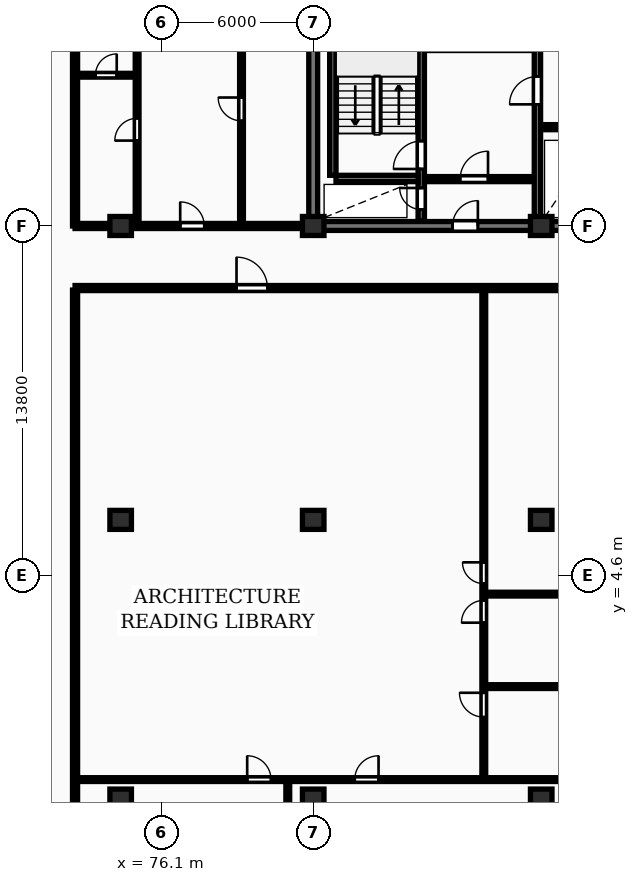
"""IFC4 building model, lengths in metres.
Left out: names, types, materials, properties, quantities, classifications, styles, units other than length and angle.
Written with IfcOpenShell. Run it as: python <this file> out.ifc"""

import sys

from ifc_helpers import new_model, si_unit, direction, frame, frame_2d, origin, origin_2d, place, context, subcontext, project, spatial, rectangle, extrude, element, fill, save


model = new_model("IFC4")
c1 = context("Model", 3, precision=1e-05, world=origin(), true_north=direction((0.0, 1.0)))
c2 = subcontext(c1, "Body", "Model", "MODEL_VIEW")
j1 = project(units=[si_unit("LENGTHUNIT", "METRE"), si_unit("PLANEANGLEUNIT", "RADIAN")], contexts=[c1])
p1 = place(None, origin())
s1 = spatial("IfcSite", under=j1, at=p1, CompositionType="ELEMENT")
p2 = place(p1, origin())
s2 = spatial("IfcBuilding", under=s1, at=p2, CompositionType="ELEMENT")
p3 = place(p2, frame((0.0, 0.0, 113.3)))
s3 = spatial("IfcBuildingStorey", under=s2, at=p3, CompositionType="ELEMENT", Elevation=113.3)
for number, where, z_axis, x_axis in (
    (1, (74.5, -4.2, 0.0), (0.0, 0.0, 1.0), (1.0, 0.0, 0.0)),
    (2, (74.5, 6.8, 0.0), (0.0, 0.0, 1.0), (1.0, 0.0, 0.0)),
    (3, (74.5, 18.4, 0.0), (0.0, 0.0, 1.0), (1.0, 0.0, 0.0)),
    (4, (82.1, -4.2, 0.0), (0.0, 0.0, 1.0), (1.0, 0.0, 0.0)),
    (5, (82.1, 6.8, 0.0), (0.0, 0.0, 1.0), (1.0, 0.0, 0.0)),
    (6, (82.1, 18.4, 0.0), (0.0, 0.0, 1.0), (1.0, 0.0, 0.0)),
    (7, (91.1, -4.2, 0.0), (0.0, 0.0, 1.0), (1.0, 0.0, 0.0)),
    (8, (91.1, 6.8, 0.0), (0.0, 0.0, 1.0), (1.0, 0.0, 0.0)),
    (9, (91.1, 18.4, 0.0), (0.0, 0.0, 1.0), (1.0, 0.0, 0.0)),
):
    element("IfcColumn", number, at=place(p3, frame(where, z_axis=z_axis, x_axis=x_axis)), inside=s3, PredefinedType="COLUMN", context=c2, shape_type="SweptSolid", body=[
        extrude(rectangle(XDim=0.85, YDim=0.75, at=origin_2d()), origin(), (0.0, 0.0, 1.0), 3.25),
    ])
p4 = place(p3, frame((82.1, 18.575, 0.0), z_axis=(0.0, 0.0, 1.0), x_axis=(0.0, 1.0, 0.0)))
e10 = element("IfcWall", 10, at=p4, inside=s3, PredefinedType="SHEAR", context=c2, shape_type="SweptSolid", body=[
    extrude(rectangle(XDim=11.65, YDim=0.35, at=frame_2d((5.825, 0.0))), origin(), (0.0, 0.0, 1.0), 3.25),
])
p5 = place(p3, frame((81.925, 18.4, 0.0), z_axis=(0.0, 0.0, 1.0), x_axis=(1.0, 0.0, 0.0)))
e11 = element("IfcWall", 11, at=p5, inside=s3, PredefinedType="SHEAR", context=c2, shape_type="SweptSolid", body=[
    extrude(rectangle(XDim=36.265, YDim=0.35, at=frame_2d((18.132, 0.0))), origin(), (0.0, 0.0, 1.0), 3.25),
])
p6 = place(p5, frame((5.675, 0.0, 0.0)))
e12 = element("IfcOpeningElement", 12, at=p6, cuts=e11, PredefinedType="OPENING", context=c2, shape_type="SweptSolid", body=[
    extrude(rectangle(XDim=1.0, YDim=2.15, at=frame_2d((0.5, 1.075))), frame((0.0, 0.185, 0.0), z_axis=(0.0, -1.0, 0.0), x_axis=(1.0, 0.0, 0.0)), (0.0, 0.0, 1.0), 0.37),
])
p7 = place(p5, frame((21.925, 0.0, 0.0)))
e13 = element("IfcOpeningElement", 13, at=p7, cuts=e11, PredefinedType="OPENING", context=c2, shape_type="SweptSolid", body=[
    extrude(rectangle(XDim=1.5, YDim=2.2, at=frame_2d((0.75, 1.1))), frame((0.0, 0.185, 0.0), z_axis=(0.0, -1.0, 0.0), x_axis=(1.0, 0.0, 0.0)), (0.0, 0.0, 1.0), 0.37),
])
p8 = place(p5, frame((29.875, 0.0, 0.0)))
e14 = element("IfcOpeningElement", 14, at=p8, cuts=e11, PredefinedType="OPENING", context=c2, shape_type="SweptSolid", body=[
    extrude(rectangle(XDim=1.0, YDim=2.15, at=frame_2d((0.5, 1.075))), frame((0.0, 0.185, 0.0), z_axis=(0.0, -1.0, 0.0), x_axis=(1.0, 0.0, 0.0)), (0.0, 0.0, 1.0), 0.37),
])
p9 = place(p3, frame((82.875, 20.4, 0.0), z_axis=(0.0, 0.0, 1.0), x_axis=(0.0, 1.0, 0.0)))
e15 = element("IfcWall", 15, at=p9, inside=s3, PredefinedType="SHEAR", context=c2, shape_type="SweptSolid", body=[
    extrude(rectangle(XDim=7.6, YDim=0.25, at=frame_2d((3.8, 0.0))), origin(), (0.0, 0.0, 1.0), 3.25),
])
p10 = place(p3, frame((86.365, 18.6, 0.0), z_axis=(0.0, 0.0, 1.0), x_axis=(0.0, 1.0, 0.0)))
e16 = element("IfcWall", 16, at=p10, inside=s3, PredefinedType="SHEAR", context=c2, shape_type="SweptSolid", body=[
    extrude(rectangle(XDim=11.6, YDim=0.25, at=frame_2d((5.8, 0.0))), origin(), (0.0, 0.0, 1.0), 3.25),
])
p11 = place(p10, frame((0.45, 0.0, 0.0)))
e17 = element("IfcOpeningElement", 17, at=p11, cuts=e16, PredefinedType="OPENING", context=c2, shape_type="SweptSolid", body=[
    extrude(rectangle(XDim=0.85, YDim=2.05, at=frame_2d((0.425, 1.025))), frame((0.0, 0.135, 0.0), z_axis=(0.0, -1.0, 0.0), x_axis=(1.0, 0.0, 0.0)), (0.0, 0.0, 1.0), 0.27),
])
p12 = place(p10, frame((2.05, 0.0, 0.0)))
e18 = element("IfcOpeningElement", 18, at=p12, cuts=e16, PredefinedType="OPENING", context=c2, shape_type="SweptSolid", body=[
    extrude(rectangle(XDim=1.1, YDim=2.1, at=frame_2d((0.55, 1.05))), frame((0.0, 0.135, 0.0), z_axis=(0.0, -1.0, 0.0), x_axis=(1.0, 0.0, 0.0)), (0.0, 0.0, 1.0), 0.27),
])
p13 = place(p10, frame((9.95, 0.0, 0.0)))
e19 = element("IfcOpeningElement", 19, at=p13, cuts=e16, PredefinedType="OPENING", context=c2, shape_type="SweptSolid", body=[
    extrude(rectangle(XDim=0.85, YDim=2.05, at=frame_2d((0.425, 1.025))), frame((0.0, 0.135, 0.0), z_axis=(0.0, -1.0, 0.0), x_axis=(1.0, 0.0, 0.0)), (0.0, 0.0, 1.0), 0.27),
])
p14 = place(p3, frame((83.0, 20.275, 0.0), z_axis=(0.0, 0.0, 1.0), x_axis=(1.0, 0.0, 0.0)))
e20 = element("IfcWall", 20, at=p14, inside=s3, PredefinedType="SHEAR", context=c2, shape_type="SweptSolid", body=[
    extrude(rectangle(XDim=3.24, YDim=0.25, at=frame_2d((1.62, 0.0))), origin(), (0.0, 0.0, 1.0), 3.25),
])
p15 = place(p3, frame((86.5, 20.25, 0.0), z_axis=(0.0, 0.0, 1.0), x_axis=(1.0, 0.0, 0.0)))
e21 = element("IfcWall", 21, at=p15, inside=s3, PredefinedType="PARTITIONING", context=c2, shape_type="SweptSolid", body=[
    extrude(rectangle(XDim=4.32, YDim=0.2, at=frame_2d((2.16, 0.0))), origin(), (0.0, 0.0, 1.0), 2.97),
])
p16 = place(p15, frame((1.4, 0.0, 0.0)))
e22 = element("IfcOpeningElement", 22, at=p16, cuts=e21, PredefinedType="OPENING", context=c2, shape_type="SweptSolid", body=[
    extrude(rectangle(XDim=1.1, YDim=2.1, at=frame_2d((0.55, 1.05))), frame((0.0, 0.11, 0.0), z_axis=(0.0, -1.0, 0.0), x_axis=(1.0, 0.0, 0.0)), (0.0, 0.0, 1.0), 0.22),
])
p17 = place(p3, frame((90.95, 18.6, 0.0), z_axis=(0.0, 0.0, 1.0), x_axis=(0.0, 1.0, 0.0)))
e23 = element("IfcWall", 23, at=p17, inside=s3, PredefinedType="SHEAR", context=c2, shape_type="SweptSolid", body=[
    extrude(rectangle(XDim=11.6, YDim=0.25, at=frame_2d((5.8, 0.0))), origin(), (0.0, 0.0, 1.0), 3.25),
])
p18 = place(p17, frame((4.6, 0.0, 0.0)))
e24 = element("IfcOpeningElement", 24, at=p18, cuts=e23, PredefinedType="OPENING", context=c2, shape_type="SweptSolid", body=[
    extrude(rectangle(XDim=1.1, YDim=2.1, at=frame_2d((0.55, 1.05))), frame((0.0, 0.135, 0.0), z_axis=(0.0, -1.0, 0.0), x_axis=(1.0, 0.0, 0.0)), (0.0, 0.0, 1.0), 0.27),
])
p19 = place(p3, frame((91.08, 22.3, 0.0), z_axis=(0.0, 0.0, 1.0), x_axis=(1.0, 0.0, 0.0)))
e25 = element("IfcWall", 25, at=p19, inside=s3, PredefinedType="PARTITIONING", context=c2, shape_type="SweptSolid", body=[
    extrude(rectangle(XDim=19.14, YDim=0.2, at=frame_2d((9.57, 0.0))), origin(), (0.0, 0.0, 1.0), 2.97),
])
p20 = place(p19, frame((1.15, 0.0, 0.0)))
e26 = element("IfcOpeningElement", 26, at=p20, cuts=e25, PredefinedType="OPENING", context=c2, shape_type="SweptSolid", body=[
    extrude(rectangle(XDim=0.85, YDim=2.05, at=frame_2d((0.425, 1.025))), frame((0.0, 0.11, 0.0), z_axis=(0.0, -1.0, 0.0), x_axis=(1.0, 0.0, 0.0)), (0.0, 0.0, 1.0), 0.22),
])
p21 = place(p19, frame((3.2, 0.0, 0.0)))
e27 = element("IfcOpeningElement", 27, at=p21, cuts=e25, PredefinedType="OPENING", context=c2, shape_type="SweptSolid", body=[
    extrude(rectangle(XDim=0.85, YDim=2.05, at=frame_2d((0.425, 1.025))), frame((0.0, 0.11, 0.0), z_axis=(0.0, -1.0, 0.0), x_axis=(1.0, 0.0, 0.0)), (0.0, 0.0, 1.0), 0.22),
])
p22 = place(p19, frame((12.72, 0.0, 0.0)))
e28 = element("IfcOpeningElement", 28, at=p22, cuts=e25, PredefinedType="OPENING", context=c2, shape_type="SweptSolid", body=[
    extrude(rectangle(XDim=1.5, YDim=2.2, at=frame_2d((0.75, 1.1))), frame((0.0, 0.11, 0.0), z_axis=(0.0, -1.0, 0.0), x_axis=(1.0, 0.0, 0.0)), (0.0, 0.0, 1.0), 0.22),
])
p23 = place(p19, frame((6.42, 0.0, 0.0)))
e29 = element("IfcOpeningElement", 29, at=p23, cuts=e25, PredefinedType="OPENING", context=c2, shape_type="SweptSolid", body=[
    extrude(rectangle(XDim=0.92, YDim=2.08, at=frame_2d((0.46, 1.04))), frame((0.0, 0.11, 0.0), z_axis=(0.0, -1.0, 0.0), x_axis=(1.0, 0.0, 0.0)), (0.0, 0.0, 1.0), 0.22),
])
p24 = place(p19, frame((15.87, 0.0, 0.0)))
e30 = element("IfcOpeningElement", 30, at=p24, cuts=e25, PredefinedType="OPENING", context=c2, shape_type="SweptSolid", body=[
    extrude(rectangle(XDim=0.92, YDim=2.08, at=frame_2d((0.46, 1.04))), frame((0.0, 0.11, 0.0), z_axis=(0.0, -1.0, 0.0), x_axis=(1.0, 0.0, 0.0)), (0.0, 0.0, 1.0), 0.22),
])
p25 = place(p3, frame((72.7, 18.4, 0.0), z_axis=(0.0, 0.0, 1.0), x_axis=(0.0, 1.0, 0.0)))
e31 = element("IfcWall", 31, at=p25, inside=s3, PredefinedType="PARTITIONING", context=c2, shape_type="SweptSolid", body=[
    extrude(rectangle(XDim=14.1, YDim=0.2, at=frame_2d((7.05, 0.0))), origin(), (0.0, 0.0, 1.0), 2.97),
])
p26 = place(p3, frame((72.7, 24.35, 0.0), z_axis=(0.0, 0.0, 1.0), x_axis=(1.0, 0.0, 0.0)))
e32 = element("IfcWall", 32, at=p26, inside=s3, PredefinedType="PARTITIONING", context=c2, shape_type="SweptSolid", body=[
    extrude(rectangle(XDim=2.45, YDim=0.15, at=frame_2d((1.225, 0.0))), origin(), (0.0, 0.0, 1.0), 2.97),
])
p27 = place(p26, frame((0.805, 0.0, 0.0)))
e33 = element("IfcOpeningElement", 33, at=p27, cuts=e32, PredefinedType="OPENING", context=c2, shape_type="SweptSolid", body=[
    extrude(rectangle(XDim=0.84, YDim=2.04, at=frame_2d((0.42, 1.02))), frame((0.0, 0.085, 0.0), z_axis=(0.0, -1.0, 0.0), x_axis=(1.0, 0.0, 0.0)), (0.0, 0.0, 1.0), 0.17),
])
p28 = place(p3, frame((75.15, 18.45, 0.0), z_axis=(0.0, 0.0, 1.0), x_axis=(0.0, 1.0, 0.0)))
e34 = element("IfcWall", 34, at=p28, inside=s3, PredefinedType="PARTITIONING", context=c2, shape_type="SweptSolid", body=[
    extrude(rectangle(XDim=14.05, YDim=0.15, at=frame_2d((7.025, 0.0))), origin(), (0.0, 0.0, 1.0), 2.97),
])
p29 = place(p28, frame((3.32, 0.0, 0.0)))
e35 = element("IfcOpeningElement", 35, at=p29, cuts=e34, PredefinedType="OPENING", context=c2, shape_type="SweptSolid", body=[
    extrude(rectangle(XDim=0.88, YDim=2.06, at=frame_2d((0.44, 1.03))), frame((0.0, 0.085, 0.0), z_axis=(0.0, -1.0, 0.0), x_axis=(1.0, 0.0, 0.0)), (0.0, 0.0, 1.0), 0.17),
])
p30 = place(p3, frame((79.27, 18.45, 0.0), z_axis=(0.0, 0.0, 1.0), x_axis=(0.0, 1.0, 0.0)))
e36 = element("IfcWall", 36, at=p30, inside=s3, PredefinedType="PARTITIONING", context=c2, shape_type="SweptSolid", body=[
    extrude(rectangle(XDim=9.12, YDim=0.15, at=frame_2d((4.56, 0.0))), origin(), (0.0, 0.0, 1.0), 2.97),
])
p31 = place(p30, frame((4.1, 0.0, 0.0)))
e37 = element("IfcOpeningElement", 37, at=p31, cuts=e36, PredefinedType="OPENING", context=c2, shape_type="SweptSolid", body=[
    extrude(rectangle(XDim=0.92, YDim=2.08, at=frame_2d((0.46, 1.04))), frame((0.0, 0.085, 0.0), z_axis=(0.0, -1.0, 0.0), x_axis=(1.0, 0.0, 0.0)), (0.0, 0.0, 1.0), 0.17),
])
p32 = place(p3, frame((72.7, 18.4, 0.0), z_axis=(0.0, 0.0, 1.0), x_axis=(1.0, 0.0, 0.0)))
e38 = element("IfcWall", 38, at=p32, inside=s3, PredefinedType="PARTITIONING", context=c2, shape_type="SweptSolid", body=[
    extrude(rectangle(XDim=9.25, YDim=0.2, at=frame_2d((4.625, 0.0))), origin(), (0.0, 0.0, 1.0), 2.358),
])
p33 = place(p32, frame((4.15, 0.0, 0.0)))
e39 = element("IfcOpeningElement", 39, at=p33, cuts=e38, PredefinedType="OPENING", context=c2, shape_type="SweptSolid", body=[
    extrude(rectangle(XDim=0.95, YDim=2.15, at=frame_2d((0.475, 1.075))), frame((0.0, 0.11, 0.0), z_axis=(0.0, -1.0, 0.0), x_axis=(1.0, 0.0, 0.0)), (0.0, 0.0, 1.0), 0.22),
])
p34 = place(p3, frame((72.7, -8.7, 0.0), z_axis=(0.0, 0.0, 1.0), x_axis=(0.0, 1.0, 0.0)))
e40 = element("IfcWall", 40, at=p34, inside=s3, PredefinedType="PARTITIONING", context=c2, shape_type="SweptSolid", body=[
    extrude(rectangle(XDim=24.57, YDim=0.2, at=frame_2d((12.285, 0.0))), origin(), (0.0, 0.0, 1.0), 2.97),
])
for number, where, z_axis, x_axis in (
    (41, (88.893, 0.22, 0.0), (0.0, 0.0, 1.0), (1.0, 0.0, 0.0)),
    (42, (88.893, 3.87, 0.0), (0.0, 0.0, 1.0), (1.0, 0.0, 0.0)),
):
    element("IfcWall", number, at=place(p3, frame(where, z_axis=z_axis, x_axis=x_axis)), inside=s3, PredefinedType="PARTITIONING", context=c2, shape_type="SweptSolid", body=[
        extrude(rectangle(XDim=3.36, YDim=0.15, at=frame_2d((1.68, 0.0))), origin(), (0.0, 0.0, 1.0), 2.97),
    ])
p35 = place(p3, frame((88.833, -3.39, 0.0), z_axis=(0.0, 0.0, 1.0), x_axis=(0.0, 1.0, 0.0)))
e43 = element("IfcWall", 43, at=p35, inside=s3, PredefinedType="PARTITIONING", context=c2, shape_type="SweptSolid", body=[
    extrude(rectangle(XDim=19.28, YDim=0.15, at=frame_2d((9.64, 0.0))), origin(), (0.0, 0.0, 1.0), 2.97),
])
p36 = place(p35, frame((2.406, 0.0, 0.0)))
e44 = element("IfcOpeningElement", 44, at=p36, cuts=e43, PredefinedType="OPENING", context=c2, shape_type="SweptSolid", body=[
    extrude(rectangle(XDim=0.96, YDim=2.1, at=frame_2d((0.48, 1.05))), frame((0.0, 0.085, 0.0), z_axis=(0.0, -1.0, 0.0), x_axis=(1.0, 0.0, 0.0)), (0.0, 0.0, 1.0), 0.17),
])
p37 = place(p35, frame((6.133, 0.0, 0.0)))
e45 = element("IfcOpeningElement", 45, at=p37, cuts=e43, PredefinedType="OPENING", context=c2, shape_type="SweptSolid", body=[
    extrude(rectangle(XDim=0.88, YDim=2.06, at=frame_2d((0.44, 1.03))), frame((0.0, 0.085, 0.0), z_axis=(0.0, -1.0, 0.0), x_axis=(1.0, 0.0, 0.0)), (0.0, 0.0, 1.0), 0.17),
])
p38 = place(p35, frame((7.674, 0.0, 0.0)))
e46 = element("IfcOpeningElement", 46, at=p38, cuts=e43, PredefinedType="OPENING", context=c2, shape_type="SweptSolid", body=[
    extrude(rectangle(XDim=0.84, YDim=2.04, at=frame_2d((0.42, 1.02))), frame((0.0, 0.085, 0.0), z_axis=(0.0, -1.0, 0.0), x_axis=(1.0, 0.0, 0.0)), (0.0, 0.0, 1.0), 0.17),
])
p39 = place(p3, frame((81.097, -8.7, 0.0), z_axis=(0.0, 0.0, 1.0), x_axis=(0.0, 1.0, 0.0)))
e47 = element("IfcWall", 47, at=p39, inside=s3, PredefinedType="PARTITIONING", context=c2, shape_type="SweptSolid", body=[
    extrude(rectangle(XDim=5.17, YDim=0.15, at=frame_2d((2.585, 0.0))), origin(), (0.0, 0.0, 1.0), 2.97),
])
p40 = place(p3, frame((72.78, -3.45, 0.0), z_axis=(0.0, 0.0, 1.0), x_axis=(1.0, 0.0, 0.0)))
e48 = element("IfcWall", 48, at=p40, inside=s3, PredefinedType="PARTITIONING", context=c2, shape_type="SweptSolid", body=[
    extrude(rectangle(XDim=19.473, YDim=0.15, at=frame_2d((9.737, 0.0))), origin(), (0.0, 0.0, 1.0), 2.97),
])
p41 = place(p40, frame((6.714, 0.0, 0.0)))
e49 = element("IfcOpeningElement", 49, at=p41, cuts=e48, PredefinedType="OPENING", context=c2, shape_type="SweptSolid", body=[
    extrude(rectangle(XDim=0.94, YDim=2.1, at=frame_2d((0.47, 1.05))), frame((0.0, 0.085, 0.0), z_axis=(0.0, -1.0, 0.0), x_axis=(1.0, 0.0, 0.0)), (0.0, 0.0, 1.0), 0.17),
])
p42 = place(p40, frame((10.959, 0.0, 0.0)))
e50 = element("IfcOpeningElement", 50, at=p42, cuts=e48, PredefinedType="OPENING", context=c2, shape_type="SweptSolid", body=[
    extrude(rectangle(XDim=0.94, YDim=2.1, at=frame_2d((0.47, 1.05))), frame((0.0, 0.085, 0.0), z_axis=(0.0, -1.0, 0.0), x_axis=(1.0, 0.0, 0.0)), (0.0, 0.0, 1.0), 0.17),
])
p43 = place(p3, frame((72.7, 15.95, 0.0), z_axis=(0.0, 0.0, 1.0), x_axis=(1.0, 0.0, 0.0)))
e51 = element("IfcWall", 51, at=p43, inside=s3, PredefinedType="PARTITIONING", context=c2, shape_type="SweptSolid", body=[
    extrude(rectangle(XDim=58.0, YDim=0.2, at=frame_2d((29.0, 0.0))), origin(), (0.0, 0.0, 1.0), 2.97),
])
p44 = place(p43, frame((6.373, 0.0, 0.0)))
e52 = element("IfcOpeningElement", 52, at=p44, cuts=e51, PredefinedType="OPENING", context=c2, shape_type="SweptSolid", body=[
    extrude(rectangle(XDim=1.22, YDim=2.18, at=frame_2d((0.61, 1.09))), frame((0.0, 0.11, 0.0), z_axis=(0.0, -1.0, 0.0), x_axis=(1.0, 0.0, 0.0)), (0.0, 0.0, 1.0), 0.22),
])
p45 = place(p43, frame((21.678, 0.0, 0.0)))
e53 = element("IfcOpeningElement", 53, at=p45, cuts=e51, PredefinedType="OPENING", context=c2, shape_type="SweptSolid", body=[
    extrude(rectangle(XDim=0.95, YDim=2.15, at=frame_2d((0.475, 1.075))), frame((0.0, 0.11, 0.0), z_axis=(0.0, -1.0, 0.0), x_axis=(1.0, 0.0, 0.0)), (0.0, 0.0, 1.0), 0.22),
])
p46 = place(p43, frame((33.812, 0.0, 0.0)))
e54 = element("IfcOpeningElement", 54, at=p46, cuts=e51, PredefinedType="OPENING", context=c2, shape_type="SweptSolid", body=[
    extrude(rectangle(XDim=0.95, YDim=2.15, at=frame_2d((0.475, 1.075))), frame((0.0, 0.11, 0.0), z_axis=(0.0, -1.0, 0.0), x_axis=(1.0, 0.0, 0.0)), (0.0, 0.0, 1.0), 0.22),
])
p47 = place(p43, frame((47.928, 0.0, 0.0)))
e55 = element("IfcOpeningElement", 55, at=p47, cuts=e51, PredefinedType="OPENING", context=c2, shape_type="SweptSolid", body=[
    extrude(rectangle(XDim=0.95, YDim=2.15, at=frame_2d((0.475, 1.075))), frame((0.0, 0.11, 0.0), z_axis=(0.0, -1.0, 0.0), x_axis=(1.0, 0.0, 0.0)), (0.0, 0.0, 1.0), 0.22),
])
p48 = place(p6, origin())
e56 = element("IfcDoor", 56, at=p48, inside=s3, OperationType="SINGLE_SWING_RIGHT", PredefinedType="DOOR", context=c2, shape_type="SweptSolid", body=[
    extrude(rectangle(XDim=1.0, YDim=2.15, at=frame_2d((0.5, 1.075))), frame((0.0, 0.025, 0.0), z_axis=(0.0, -1.0, 0.0), x_axis=(1.0, 0.0, 0.0)), (0.0, 0.0, 1.0), 0.05),
])
fill(e12, e56)
p49 = place(p11, origin())
e57 = element("IfcDoor", 57, at=p49, inside=s3, OperationType="SINGLE_SWING_RIGHT", PredefinedType="DOOR", context=c2, shape_type="SweptSolid", body=[
    extrude(rectangle(XDim=0.85, YDim=2.05, at=frame_2d((0.425, 1.025))), frame((0.0, 0.025, 0.0), z_axis=(0.0, -1.0, 0.0), x_axis=(1.0, 0.0, 0.0)), (0.0, 0.0, 1.0), 0.05),
])
fill(e17, e57)
p50 = place(p12, origin())
e58 = element("IfcDoor", 58, at=p50, inside=s3, OperationType="SINGLE_SWING_LEFT", PredefinedType="DOOR", context=c2, shape_type="SweptSolid", body=[
    extrude(rectangle(XDim=1.1, YDim=2.1, at=frame_2d((0.55, 1.05))), frame((0.0, 0.025, 0.0), z_axis=(0.0, -1.0, 0.0), x_axis=(1.0, 0.0, 0.0)), (0.0, 0.0, 1.0), 0.05),
])
fill(e18, e58)
p51 = place(p16, origin())
e59 = element("IfcDoor", 59, at=p51, inside=s3, OperationType="SINGLE_SWING_RIGHT", PredefinedType="DOOR", context=c2, shape_type="SweptSolid", body=[
    extrude(rectangle(XDim=1.1, YDim=2.1, at=frame_2d((0.55, 1.05))), frame((0.0, 0.025, 0.0), z_axis=(0.0, -1.0, 0.0), x_axis=(1.0, 0.0, 0.0)), (0.0, 0.0, 1.0), 0.05),
])
fill(e22, e59)
p52 = place(p18, origin())
e60 = element("IfcDoor", 60, at=p52, inside=s3, OperationType="SINGLE_SWING_LEFT", PredefinedType="DOOR", context=c2, shape_type="SweptSolid", body=[
    extrude(rectangle(XDim=1.1, YDim=2.1, at=frame_2d((0.55, 1.05))), frame((0.0, 0.025, 0.0), z_axis=(0.0, -1.0, 0.0), x_axis=(1.0, 0.0, 0.0)), (0.0, 0.0, 1.0), 0.05),
])
fill(e24, e60)
p53 = place(p27, origin())
e61 = element("IfcDoor", 61, at=p53, inside=s3, OperationType="SINGLE_SWING_RIGHT", PredefinedType="DOOR", context=c2, shape_type="SweptSolid", body=[
    extrude(rectangle(XDim=0.84, YDim=2.04, at=frame_2d((0.42, 1.02))), frame((0.0, 0.025, 0.0), z_axis=(0.0, -1.0, 0.0), x_axis=(1.0, 0.0, 0.0)), (0.0, 0.0, 1.0), 0.05),
])
fill(e33, e61)
p54 = place(p29, origin())
e62 = element("IfcDoor", 62, at=p54, inside=s3, OperationType="SINGLE_SWING_LEFT", PredefinedType="DOOR", context=c2, shape_type="SweptSolid", body=[
    extrude(rectangle(XDim=0.88, YDim=2.06, at=frame_2d((0.44, 1.03))), frame((0.0, 0.025, 0.0), z_axis=(0.0, -1.0, 0.0), x_axis=(1.0, 0.0, 0.0)), (0.0, 0.0, 1.0), 0.05),
])
fill(e35, e62)
p55 = place(p31, origin())
e63 = element("IfcDoor", 63, at=p55, inside=s3, OperationType="SINGLE_SWING_RIGHT", PredefinedType="DOOR", context=c2, shape_type="SweptSolid", body=[
    extrude(rectangle(XDim=0.92, YDim=2.08, at=frame_2d((0.46, 1.04))), frame((0.0, 0.025, 0.0), z_axis=(0.0, -1.0, 0.0), x_axis=(1.0, 0.0, 0.0)), (0.0, 0.0, 1.0), 0.05),
])
fill(e37, e63)
p56 = place(p33, origin())
e64 = element("IfcDoor", 64, at=p56, inside=s3, OperationType="SINGLE_SWING_LEFT", PredefinedType="DOOR", context=c2, shape_type="SweptSolid", body=[
    extrude(rectangle(XDim=0.95, YDim=2.15, at=frame_2d((0.475, 1.075))), frame((0.0, 0.025, 0.0), z_axis=(0.0, -1.0, 0.0), x_axis=(1.0, 0.0, 0.0)), (0.0, 0.0, 1.0), 0.05),
])
fill(e39, e64)
p57 = place(p36, origin())
e65 = element("IfcDoor", 65, at=p57, inside=s3, OperationType="SINGLE_SWING_RIGHT", PredefinedType="DOOR", context=c2, shape_type="SweptSolid", body=[
    extrude(rectangle(XDim=0.96, YDim=2.1, at=frame_2d((0.48, 1.05))), frame((0.0, 0.025, 0.0), z_axis=(0.0, -1.0, 0.0), x_axis=(1.0, 0.0, 0.0)), (0.0, 0.0, 1.0), 0.05),
])
fill(e44, e65)
p58 = place(p37, origin())
e66 = element("IfcDoor", 66, at=p58, inside=s3, OperationType="SINGLE_SWING_LEFT", PredefinedType="DOOR", context=c2, shape_type="SweptSolid", body=[
    extrude(rectangle(XDim=0.88, YDim=2.06, at=frame_2d((0.44, 1.03))), frame((0.0, 0.025, 0.0), z_axis=(0.0, -1.0, 0.0), x_axis=(1.0, 0.0, 0.0)), (0.0, 0.0, 1.0), 0.05),
])
fill(e45, e66)
p59 = place(p38, origin())
e67 = element("IfcDoor", 67, at=p59, inside=s3, OperationType="SINGLE_SWING_RIGHT", PredefinedType="DOOR", context=c2, shape_type="SweptSolid", body=[
    extrude(rectangle(XDim=0.84, YDim=2.04, at=frame_2d((0.42, 1.02))), frame((0.0, 0.025, 0.0), z_axis=(0.0, -1.0, 0.0), x_axis=(1.0, 0.0, 0.0)), (0.0, 0.0, 1.0), 0.05),
])
fill(e46, e67)
p60 = place(p41, origin())
e68 = element("IfcDoor", 68, at=p60, inside=s3, OperationType="SINGLE_SWING_LEFT", PredefinedType="DOOR", context=c2, shape_type="SweptSolid", body=[
    extrude(rectangle(XDim=0.94, YDim=2.1, at=frame_2d((0.47, 1.05))), frame((0.0, 0.025, 0.0), z_axis=(0.0, -1.0, 0.0), x_axis=(1.0, 0.0, 0.0)), (0.0, 0.0, 1.0), 0.05),
])
fill(e49, e68)
p61 = place(p42, origin())
e69 = element("IfcDoor", 69, at=p61, inside=s3, OperationType="SINGLE_SWING_RIGHT", PredefinedType="DOOR", context=c2, shape_type="SweptSolid", body=[
    extrude(rectangle(XDim=0.94, YDim=2.1, at=frame_2d((0.47, 1.05))), frame((0.0, 0.025, 0.0), z_axis=(0.0, -1.0, 0.0), x_axis=(1.0, 0.0, 0.0)), (0.0, 0.0, 1.0), 0.05),
])
fill(e50, e69)
p62 = place(p44, origin())
e70 = element("IfcDoor", 70, at=p62, inside=s3, OperationType="SINGLE_SWING_LEFT", PredefinedType="DOOR", context=c2, shape_type="SweptSolid", body=[
    extrude(rectangle(XDim=1.22, YDim=2.18, at=frame_2d((0.61, 1.09))), frame((0.0, 0.025, 0.0), z_axis=(0.0, -1.0, 0.0), x_axis=(1.0, 0.0, 0.0)), (0.0, 0.0, 1.0), 0.05),
])
fill(e52, e70)
save(model, sys.argv[1])
